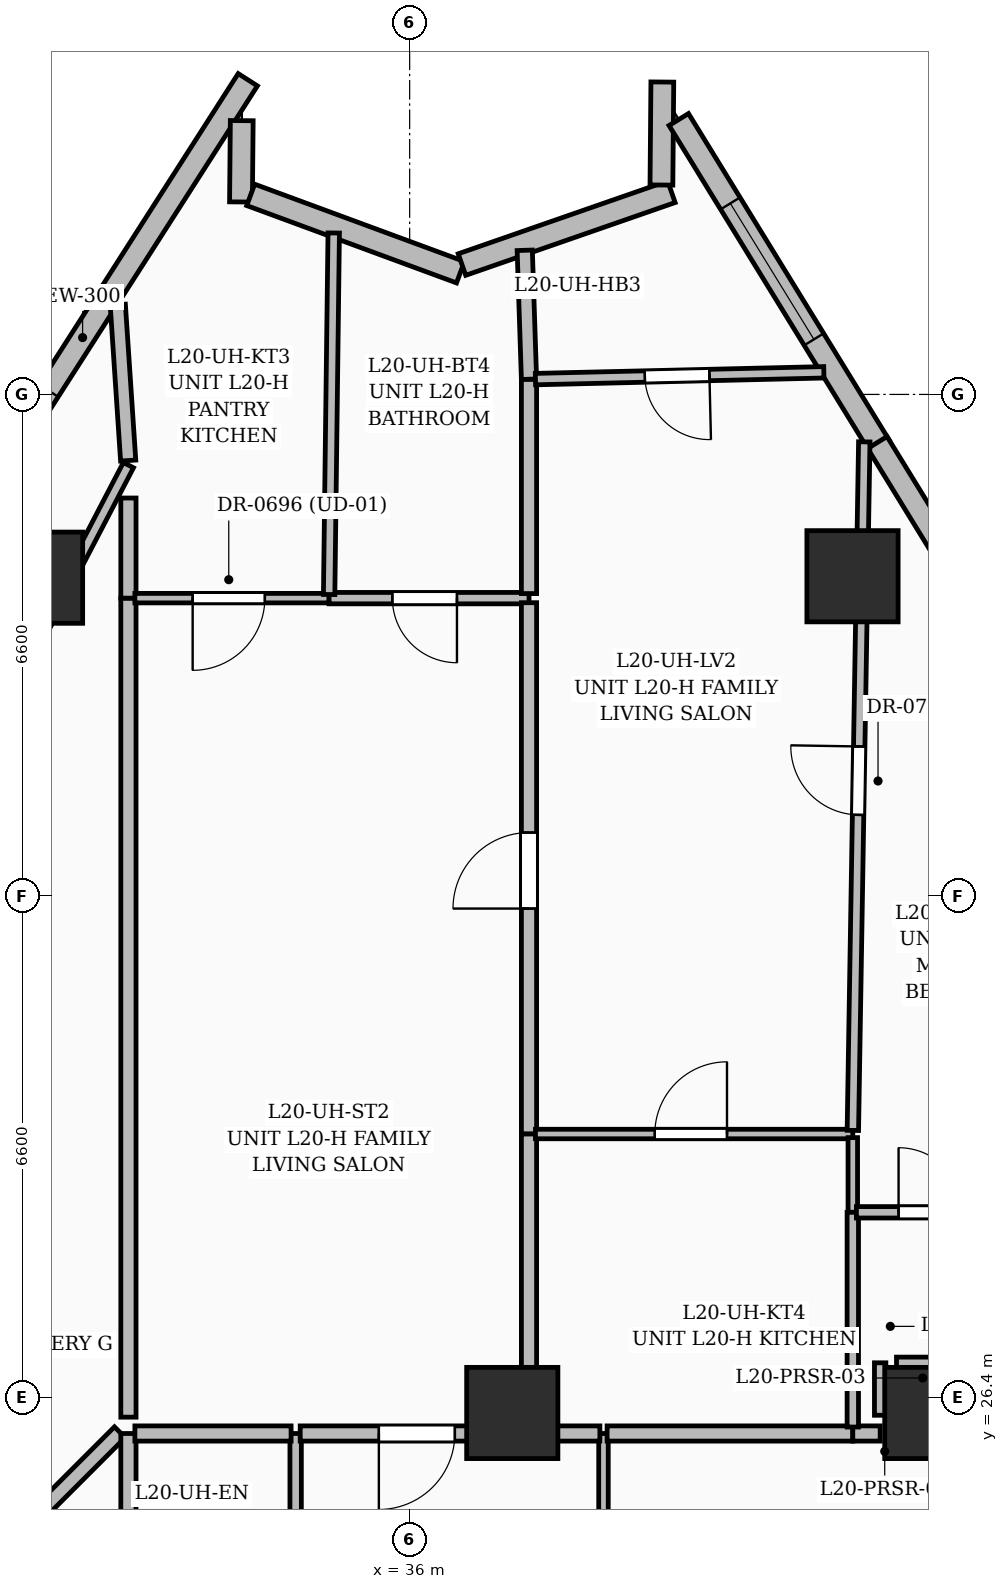
"""IFC4 building model, lengths in metres.
Left out: names, types, materials, properties, quantities, classifications, styles, units other than length and angle.
Written with IfcOpenShell. Run it as: python <this file> out.ifc"""

import sys

from ifc_helpers import new_model, si_unit, direction, frame, frame_2d, origin, origin_2d, place, context, subcontext, project, spatial, rectangle, extrude, element, fill, save


model = new_model("IFC4")
c1 = context("Model", 3, precision=1e-05, world=origin(), true_north=direction((0.0, 1.0)))
c2 = subcontext(c1, "Body", "Model", "MODEL_VIEW")
j1 = project(units=[si_unit("LENGTHUNIT", "METRE"), si_unit("PLANEANGLEUNIT", "RADIAN")], contexts=[c1])
p1 = place(None, origin())
s1 = spatial("IfcSite", under=j1, at=p1, CompositionType="ELEMENT")
p2 = place(p1, origin())
s2 = spatial("IfcBuilding", under=s1, at=p2, CompositionType="ELEMENT")
p3 = place(p2, frame((0.0, 0.0, 82.2)))
s3 = spatial("IfcBuildingStorey", under=s2, at=p3, CompositionType="ELEMENT", Elevation=82.2)
for number, where, z_axis, x_axis in (
    (1, (42.85, 26.2, 0.0), (0.0, 0.0, 1.0), (1.0, 0.0, 0.0)),
    (2, (37.35, 26.2, 0.0), (0.0, 0.0, 1.0), (1.0, 0.0, 0.0)),
    (3, (41.826, 37.208, 0.0), (0.0, 0.0, 1.0), (1.0, 0.0, 0.0)),
    (4, (31.098, 37.189, 0.0), (0.0, 0.0, 1.0), (1.0, 0.0, 0.0)),
):
    element("IfcColumn", number, at=place(p3, frame(where, z_axis=z_axis, x_axis=x_axis)), inside=s3, PredefinedType="COLUMN", context=c2, shape_type="SweptSolid", body=[
        extrude(rectangle(XDim=1.2, YDim=1.2, at=origin_2d()), origin(), (0.0, 0.0, 1.0), 3.6),
    ])
p4 = place(p3, frame((29.524, 36.955, 0.0), z_axis=(0.0, 0.0, 1.0), x_axis=(0.539470626143, 0.842004420136, 0.0)))
e5 = element("IfcWall", 5, at=p4, inside=s3, PredefinedType="SOLIDWALL", context=c2, shape_type="SweptSolid", body=[
    extrude(rectangle(XDim=8.058, YDim=0.3, at=frame_2d((4.029, 0.0))), origin(), (0.0, 0.0, 1.0), 3.35),
])
p5 = place(p4, frame((1.1, 0.0, 0.55)))
e6 = element("IfcOpeningElement", 6, at=p5, cuts=e5, PredefinedType="OPENING", context=c2, shape_type="SweptSolid", body=[
    extrude(rectangle(XDim=2.1, YDim=2.4, at=frame_2d((1.05, 1.2))), frame((0.0, 0.16, 0.0), z_axis=(0.0, -1.0, 0.0), x_axis=(1.0, 0.0, 0.0)), (0.0, 0.0, 1.0), 0.32),
])
p6 = place(p3, frame((33.791, 43.202, 0.0), z_axis=(0.0, 0.0, 1.0), x_axis=(-0.009584224316, -0.999954070267, 0.0)))
e7 = element("IfcWall", 7, at=p6, inside=s3, PredefinedType="SOLIDWALL", context=c2, shape_type="SweptSolid", body=[
    extrude(rectangle(XDim=1.07, YDim=0.3, at=frame_2d((0.535, 0.0))), origin(), (0.0, 0.0, 1.0), 3.35),
])
p7 = place(p3, frame((33.909, 42.225, 0.0), z_axis=(0.0, 0.0, 1.0), x_axis=(0.938225446259, -0.346024582931, 0.0)))
e8 = element("IfcWall", 8, at=p7, inside=s3, PredefinedType="SOLIDWALL", context=c2, shape_type="SweptSolid", body=[
    extrude(rectangle(XDim=2.941, YDim=0.3, at=frame_2d((1.471, 0.0))), origin(), (0.0, 0.0, 1.0), 3.35),
])
p8 = place(p3, frame((36.688, 41.309, 0.0), z_axis=(0.0, 0.0, 1.0), x_axis=(0.944571305793, 0.328306332978, 0.0)))
e9 = element("IfcWall", 9, at=p8, inside=s3, PredefinedType="SOLIDWALL", context=c2, shape_type="SweptSolid", body=[
    extrude(rectangle(XDim=2.917, YDim=0.3, at=frame_2d((1.458, 0.0))), origin(), (0.0, 0.0, 1.0), 3.35),
])
p9 = place(p3, frame((39.312, 42.355, 0.0), z_axis=(0.0, 0.0, 1.0), x_axis=(0.008828484753, 0.999961028169, 0.0)))
e10 = element("IfcWall", 10, at=p9, inside=s3, PredefinedType="SOLIDWALL", context=c2, shape_type="SweptSolid", body=[
    extrude(rectangle(XDim=1.355, YDim=0.3, at=frame_2d((0.677, 0.0))), origin(), (0.0, 0.0, 1.0), 3.35),
])
p10 = place(p3, frame((39.54, 43.217, 0.0), z_axis=(0.0, 0.0, 1.0), x_axis=(0.52373802156, -0.851879383935, 0.0)))
e11 = element("IfcWall", 11, at=p10, inside=s3, PredefinedType="SOLIDWALL", context=c2, shape_type="SweptSolid", body=[
    extrude(rectangle(XDim=5.042, YDim=0.3, at=frame_2d((2.521, 0.0))), origin(), (0.0, 0.0, 1.0), 3.35),
])
p11 = place(p10, frame((1.295, 0.0, 0.55)))
e12 = element("IfcOpeningElement", 12, at=p11, cuts=e11, PredefinedType="OPENING", context=c2, shape_type="SweptSolid", body=[
    extrude(rectangle(XDim=2.1, YDim=2.4, at=frame_2d((1.05, 1.2))), frame((0.0, 0.16, 0.0), z_axis=(0.0, -1.0, 0.0), x_axis=(1.0, 0.0, 0.0)), (0.0, 0.0, 1.0), 0.32),
])
p12 = place(p3, frame((42.153, 38.967, 0.0), z_axis=(0.0, 0.0, 1.0), x_axis=(0.523687465278, -0.851910464022, 0.0)))
e13 = element("IfcWall", 13, at=p12, inside=s3, PredefinedType="SOLIDWALL", context=c2, shape_type="SweptSolid", body=[
    extrude(rectangle(XDim=5.649, YDim=0.3, at=frame_2d((2.825, 0.0))), origin(), (0.0, 0.0, 1.0), 3.35),
])
p13 = place(p12, frame((1.778, 0.0, 0.55)))
e14 = element("IfcOpeningElement", 14, at=p13, cuts=e13, PredefinedType="OPENING", context=c2, shape_type="SweptSolid", body=[
    extrude(rectangle(XDim=2.1, YDim=2.4, at=frame_2d((1.05, 1.2))), frame((0.0, 0.16, 0.0), z_axis=(0.0, -1.0, 0.0), x_axis=(1.0, 0.0, 0.0)), (0.0, 0.0, 1.0), 0.32),
])
p14 = place(p3, frame((21.4, 17.75, 0.0), z_axis=(0.0, 0.0, 1.0), x_axis=(0.46207959711, 0.886838455376, 0.0)))
e15 = element("IfcWall", 15, at=p14, inside=s3, PredefinedType="PARTITIONING", context=c2, shape_type="SweptSolid", body=[
    extrude(rectangle(XDim=23.589, YDim=0.15, at=frame_2d((11.795, 0.0))), origin(), (0.0, 0.0, 1.0), 2.345),
])
p15 = place(p3, frame((32.297, 38.73, 0.0), z_axis=(0.0, 0.0, 1.0), x_axis=(-0.066629370629, 0.997777794386, 0.0)))
e16 = element("IfcWall", 16, at=p15, inside=s3, PredefinedType="PARTITIONING", context=c2, shape_type="SweptSolid", body=[
    extrude(rectangle(XDim=2.056, YDim=0.2, at=frame_2d((1.028, 0.0))), origin(), (0.0, 0.0, 1.0), 3.35),
])
p16 = place(p3, frame((32.187, 25.947, 0.0), z_axis=(0.0, 0.0, 1.0), x_axis=(-0.707106781187, -0.707106781187, 0.0)))
e17 = element("IfcWall", 17, at=p16, inside=s3, PredefinedType="PARTITIONING", context=c2, shape_type="SweptSolid", body=[
    extrude(rectangle(XDim=3.135, YDim=0.2, at=frame_2d((1.568, 0.0))), origin(), (0.0, 0.0, 1.0), 3.35),
])
p17 = place(p3, frame((32.3, 21.8, 0.0), z_axis=(0.0, 0.0, 1.0), x_axis=(0.0, 1.0, 0.0)))
e18 = element("IfcWall", 18, at=p17, inside=s3, PredefinedType="PARTITIONING", context=c2, shape_type="SweptSolid", body=[
    extrude(rectangle(XDim=4.13, YDim=0.2, at=frame_2d((2.065, 0.0))), origin(), (0.0, 0.0, 1.0), 2.709),
])
p18 = place(p3, frame((32.3, 26.145, 0.0), z_axis=(0.0, 0.0, 1.0), x_axis=(0.0, 1.0, 0.0)))
e19 = element("IfcWall", 19, at=p18, inside=s3, PredefinedType="PARTITIONING", context=c2, shape_type="SweptSolid", body=[
    extrude(rectangle(XDim=10.775, YDim=0.2, at=frame_2d((5.387, 0.0))), origin(), (0.0, 0.0, 1.0), 2.345),
])
p19 = place(p3, frame((32.3, 36.92, 0.0), z_axis=(0.0, 0.0, 1.0), x_axis=(0.0, 1.0, 0.0)))
e20 = element("IfcWall", 20, at=p19, inside=s3, PredefinedType="PARTITIONING", context=c2, shape_type="SweptSolid", body=[
    extrude(rectangle(XDim=1.317, YDim=0.2, at=frame_2d((0.659, 0.0))), origin(), (0.0, 0.0, 1.0), 2.37),
])
p20 = place(p3, frame((38.55, 25.93, 0.0), z_axis=(0.0, 0.0, 1.0), x_axis=(0.0, -1.0, 0.0)))
e21 = element("IfcWall", 21, at=p20, inside=s3, PredefinedType="PARTITIONING", context=c2, shape_type="SweptSolid", body=[
    extrude(rectangle(XDim=4.202, YDim=0.125, at=frame_2d((2.101, 0.0))), origin(), (0.0, 0.0, 1.0), 2.37),
])
p21 = place(p3, frame((41.956, 17.833, 0.0), z_axis=(0.0, 0.0, 1.0), x_axis=(0.182682671213, 0.98317192883, 0.0)))
e22 = element("IfcWall", 22, at=p21, inside=s3, PredefinedType="PARTITIONING", context=c2, shape_type="SweptSolid", body=[
    extrude(rectangle(XDim=8.235, YDim=0.2, at=frame_2d((4.118, 0.0))), origin(), (0.0, 0.0, 1.0), 2.309),
])
p22 = place(p3, frame((41.83, 25.93, 0.0), z_axis=(0.0, 0.0, 1.0), x_axis=(-1.0, 0.0, 0.0)))
e23 = element("IfcWall", 23, at=p22, inside=s3, PredefinedType="PARTITIONING", context=c2, shape_type="SweptSolid", body=[
    extrude(rectangle(XDim=3.233, YDim=0.2, at=frame_2d((1.616, 0.0))), origin(), (0.0, 0.0, 1.0), 2.37),
])
p23 = place(p3, frame((42.19, 25.93, 0.0), z_axis=(0.0, 0.0, 1.0), x_axis=(-1.0, 0.0, 0.0)))
e24 = element("IfcWall", 24, at=p23, inside=s3, PredefinedType="PARTITIONING", context=c2, shape_type="SweptSolid", body=[
    extrude(rectangle(XDim=0.36, YDim=0.2, at=frame_2d((0.18, 0.0))), origin(), (0.0, 0.0, 1.0), 2.37),
])
p24 = place(p3, frame((34.5, 25.93, 0.0), z_axis=(0.0, 0.0, 1.0), x_axis=(0.0, -1.0, 0.0)))
e25 = element("IfcWall", 25, at=p24, inside=s3, PredefinedType="PARTITIONING", context=c2, shape_type="SweptSolid", body=[
    extrude(rectangle(XDim=4.19, YDim=0.15, at=frame_2d((2.095, 0.0))), origin(), (0.0, 0.0, 1.0), 3.35),
])
p25 = place(p24, frame((1.758, 0.0, 0.0)))
e26 = element("IfcOpeningElement", 26, at=p25, cuts=e25, PredefinedType="OPENING", context=c2, shape_type="SweptSolid", body=[
    extrude(rectangle(XDim=0.85, YDim=2.1, at=frame_2d((0.425, 1.05))), frame((0.0, 0.085, 0.0), z_axis=(0.0, -1.0, 0.0), x_axis=(1.0, 0.0, 0.0)), (0.0, 0.0, 1.0), 0.17),
])
p26 = place(p3, frame((37.57, 25.93, 0.0), z_axis=(0.0, 0.0, 1.0), x_axis=(-1.0, 0.0, 0.0)))
e27 = element("IfcWall", 27, at=p26, inside=s3, PredefinedType="PARTITIONING", context=c2, shape_type="SweptSolid", body=[
    extrude(rectangle(XDim=3.01, YDim=0.2, at=frame_2d((1.505, 0.0))), origin(), (0.0, 0.0, 1.0), 3.35),
])
p27 = place(p26, frame((0.975, 0.0, 0.0)))
e28 = element("IfcOpeningElement", 28, at=p27, cuts=e27, PredefinedType="OPENING", context=c2, shape_type="SweptSolid", body=[
    extrude(rectangle(XDim=1.0, YDim=2.2, at=frame_2d((0.5, 1.1))), frame((0.0, 0.11, 0.0), z_axis=(0.0, -1.0, 0.0), x_axis=(1.0, 0.0, 0.0)), (0.0, 0.0, 1.0), 0.22),
])
p28 = place(p3, frame((38.502, 25.93, 0.0), z_axis=(0.0, 0.0, 1.0), x_axis=(-1.0, 0.0, 0.0)))
e29 = element("IfcWall", 29, at=p28, inside=s3, PredefinedType="PARTITIONING", context=c2, shape_type="SweptSolid", body=[
    extrude(rectangle(XDim=0.932, YDim=0.2, at=frame_2d((0.466, 0.0))), origin(), (0.0, 0.0, 1.0), 2.37),
])
p29 = place(p3, frame((34.44, 25.93, 0.0), z_axis=(0.0, 0.0, 1.0), x_axis=(-1.0, 0.0, 0.0)))
e30 = element("IfcWall", 30, at=p29, inside=s3, PredefinedType="PARTITIONING", context=c2, shape_type="SweptSolid", body=[
    extrude(rectangle(XDim=2.055, YDim=0.2, at=frame_2d((1.027, 0.0))), origin(), (0.0, 0.0, 1.0), 2.709),
])
p30 = place(p3, frame((34.94, 36.92, 0.0), z_axis=(0.0, 0.0, 1.0), x_axis=(-1.0, 0.0, 0.0)))
e31 = element("IfcWall", 31, at=p30, inside=s3, PredefinedType="PARTITIONING", context=c2, shape_type="SweptSolid", body=[
    extrude(rectangle(XDim=2.555, YDim=0.125, at=frame_2d((1.277, 0.0))), origin(), (0.0, 0.0, 1.0), 2.37),
])
p31 = place(p30, frame((0.845, 0.0, 0.0)))
e32 = element("IfcOpeningElement", 32, at=p31, cuts=e31, PredefinedType="OPENING", context=c2, shape_type="SweptSolid", body=[
    extrude(rectangle(XDim=0.95, YDim=2.2, at=frame_2d((0.475, 1.1))), frame((0.0, 0.072, 0.0), z_axis=(0.0, -1.0, 0.0), x_axis=(1.0, 0.0, 0.0)), (0.0, 0.0, 1.0), 0.145),
])
p32 = place(p3, frame((37.57, 36.92, 0.0), z_axis=(0.0, 0.0, 1.0), x_axis=(-1.0, 0.0, 0.0)))
e33 = element("IfcWall", 33, at=p32, inside=s3, PredefinedType="PARTITIONING", context=c2, shape_type="SweptSolid", body=[
    extrude(rectangle(XDim=2.63, YDim=0.15, at=frame_2d((1.315, 0.0))), origin(), (0.0, 0.0, 1.0), 2.37),
])
p33 = place(p32, frame((0.948, 0.0, 0.0)))
e34 = element("IfcOpeningElement", 34, at=p33, cuts=e33, PredefinedType="OPENING", context=c2, shape_type="SweptSolid", body=[
    extrude(rectangle(XDim=0.85, YDim=2.1, at=frame_2d((0.425, 1.05))), frame((0.0, 0.085, 0.0), z_axis=(0.0, -1.0, 0.0), x_axis=(1.0, 0.0, 0.0)), (0.0, 0.0, 1.0), 0.17),
])
p34 = place(p3, frame((37.57, 29.87, 0.0), z_axis=(0.0, 0.0, 1.0), x_axis=(0.0, 1.0, 0.0)))
e35 = element("IfcWall", 35, at=p34, inside=s3, PredefinedType="PARTITIONING", context=c2, shape_type="SweptSolid", body=[
    extrude(rectangle(XDim=6.99, YDim=0.2, at=frame_2d((3.495, 0.0))), origin(), (0.0, 0.0, 1.0), 2.37),
])
p35 = place(p34, frame((2.966, 0.0, 0.0)))
e36 = element("IfcOpeningElement", 36, at=p35, cuts=e35, PredefinedType="OPENING", context=c2, shape_type="SweptSolid", body=[
    extrude(rectangle(XDim=1.0, YDim=2.2, at=frame_2d((0.5, 1.1))), frame((0.0, 0.11, 0.0), z_axis=(0.0, -1.0, 0.0), x_axis=(1.0, 0.0, 0.0)), (0.0, 0.0, 1.0), 0.22),
])
p36 = place(p3, frame((37.57, 26.015, 0.0), z_axis=(0.0, 0.0, 1.0), x_axis=(0.0, 1.0, 0.0)))
e37 = element("IfcWall", 37, at=p36, inside=s3, PredefinedType="PARTITIONING", context=c2, shape_type="SweptSolid", body=[
    extrude(rectangle(XDim=3.855, YDim=0.2, at=frame_2d((1.928, 0.0))), origin(), (0.0, 0.0, 1.0), 2.709),
])
p37 = place(p3, frame((34.94, 36.968, 0.0), z_axis=(0.0, 0.0, 1.0), x_axis=(0.012728014725, 0.99991899554, 0.0)))
e38 = element("IfcWall", 38, at=p37, inside=s3, PredefinedType="PARTITIONING", context=c2, shape_type="SweptSolid", body=[
    extrude(rectangle(XDim=4.757, YDim=0.15, at=frame_2d((2.378, 0.0))), origin(), (0.0, 0.0, 1.0), 2.37),
])
p38 = place(p3, frame((37.57, 36.98, 0.0), z_axis=(0.0, 0.0, 1.0), x_axis=(0.0, 1.0, 0.0)))
e39 = element("IfcWall", 39, at=p38, inside=s3, PredefinedType="PARTITIONING", context=c2, shape_type="SweptSolid", body=[
    extrude(rectangle(XDim=2.82, YDim=0.2, at=frame_2d((1.41, 0.0))), origin(), (0.0, 0.0, 1.0), 2.37),
])
p39 = place(p3, frame((37.57, 39.8, 0.0), z_axis=(0.0, 0.0, 1.0), x_axis=(-0.033089686033, 0.999452386399, 0.0)))
e40 = element("IfcWall", 40, at=p39, inside=s3, PredefinedType="PARTITIONING", context=c2, shape_type="SweptSolid", body=[
    extrude(rectangle(XDim=1.697, YDim=0.2, at=frame_2d((0.849, 0.0))), origin(), (0.0, 0.0, 1.0), 3.35),
])
p40 = place(p3, frame((41.449, 39.891, 0.0), z_axis=(0.0, 0.0, 1.0), x_axis=(-0.999721247685, -0.02360989047, 0.0)))
e41 = element("IfcWall", 41, at=p40, inside=s3, PredefinedType="PARTITIONING", context=c2, shape_type="SweptSolid", body=[
    extrude(rectangle(XDim=3.795, YDim=0.15, at=frame_2d((1.897, 0.0))), origin(), (0.0, 0.0, 1.0), 3.35),
])
p41 = place(p40, frame((1.506, 0.0, 0.0)))
e42 = element("IfcOpeningElement", 42, at=p41, cuts=e41, PredefinedType="OPENING", context=c2, shape_type="SweptSolid", body=[
    extrude(rectangle(XDim=0.85, YDim=2.1, at=frame_2d((0.425, 1.05))), frame((0.0, 0.085, 0.0), z_axis=(0.0, -1.0, 0.0), x_axis=(1.0, 0.0, 0.0)), (0.0, 0.0, 1.0), 0.17),
])
p42 = place(p3, frame((37.655, 29.87, 0.0), z_axis=(0.0, 0.0, 1.0), x_axis=(1.0, 0.0, 0.0)))
e43 = element("IfcWall", 43, at=p42, inside=s3, PredefinedType="PARTITIONING", context=c2, shape_type="SweptSolid", body=[
    extrude(rectangle(XDim=4.175, YDim=0.125, at=frame_2d((2.087, 0.0))), origin(), (0.0, 0.0, 1.0), 3.35),
])
p43 = place(p42, frame((1.57, 0.0, 0.0)))
e44 = element("IfcOpeningElement", 44, at=p43, cuts=e43, PredefinedType="OPENING", context=c2, shape_type="SweptSolid", body=[
    extrude(rectangle(XDim=0.95, YDim=2.2, at=frame_2d((0.475, 1.1))), frame((0.0, 0.072, 0.0), z_axis=(0.0, -1.0, 0.0), x_axis=(1.0, 0.0, 0.0)), (0.0, 0.0, 1.0), 0.145),
])
p44 = place(p3, frame((41.831, 29.917, 0.0), z_axis=(0.0, 0.0, 1.0), x_axis=(0.016599696118, 0.999862215552, 0.0)))
e45 = element("IfcWall", 45, at=p44, inside=s3, PredefinedType="PARTITIONING", context=c2, shape_type="SweptSolid", body=[
    extrude(rectangle(XDim=9.06, YDim=0.15, at=frame_2d((4.53, 0.0))), origin(), (0.0, 0.0, 1.0), 2.345),
])
p45 = place(p44, frame((4.152, 0.0, 0.0)))
e46 = element("IfcOpeningElement", 46, at=p45, cuts=e45, PredefinedType="OPENING", context=c2, shape_type="SweptSolid", body=[
    extrude(rectangle(XDim=0.9, YDim=2.15, at=frame_2d((0.45, 1.075))), frame((0.0, 0.085, 0.0), z_axis=(0.0, -1.0, 0.0), x_axis=(1.0, 0.0, 0.0)), (0.0, 0.0, 1.0), 0.17),
])
p46 = place(p3, frame((41.83, 28.84, 0.0), z_axis=(0.0, 0.0, 1.0), x_axis=(0.0, 1.0, 0.0)))
e47 = element("IfcWall", 47, at=p46, inside=s3, PredefinedType="PARTITIONING", context=c2, shape_type="SweptSolid", body=[
    extrude(rectangle(XDim=0.982, YDim=0.125, at=frame_2d((0.491, 0.0))), origin(), (0.0, 0.0, 1.0), 2.709),
])
p47 = place(p3, frame((41.83, 26.015, 0.0), z_axis=(0.0, 0.0, 1.0), x_axis=(0.0, 1.0, 0.0)))
e48 = element("IfcWall", 48, at=p47, inside=s3, PredefinedType="PARTITIONING", context=c2, shape_type="SweptSolid", body=[
    extrude(rectangle(XDim=2.825, YDim=0.15, at=frame_2d((1.413, 0.0))), origin(), (0.0, 0.0, 1.0), 2.37),
])
p48 = place(p3, frame((41.877, 28.84, 0.0), z_axis=(0.0, 0.0, 1.0), x_axis=(1.0, 0.0, 0.0)))
e49 = element("IfcWall", 49, at=p48, inside=s3, PredefinedType="PARTITIONING", context=c2, shape_type="SweptSolid", body=[
    extrude(rectangle(XDim=2.038, YDim=0.15, at=frame_2d((1.019, 0.0))), origin(), (0.0, 0.0, 1.0), 2.345),
])
p49 = place(p48, frame((0.555, 0.0, 0.0)))
e50 = element("IfcOpeningElement", 50, at=p49, cuts=e49, PredefinedType="OPENING", context=c2, shape_type="SweptSolid", body=[
    extrude(rectangle(XDim=0.85, YDim=2.1, at=frame_2d((0.425, 1.05))), frame((0.0, 0.085, 0.0), z_axis=(0.0, -1.0, 0.0), x_axis=(1.0, 0.0, 0.0)), (0.0, 0.0, 1.0), 0.17),
])
p50 = place(p3, frame((42.19, 26.17, 0.0), z_axis=(0.0, 0.0, 1.0), x_axis=(0.0, 1.0, 0.0)))
e51 = element("IfcWall", 51, at=p50, inside=s3, PredefinedType="PARTITIONING", context=c2, shape_type="SweptSolid", body=[
    extrude(rectangle(XDim=0.69, YDim=0.15, at=frame_2d((0.345, 0.0))), origin(), (0.0, 0.0, 1.0), 2.37),
])
p51 = place(p3, frame((42.405, 26.86, 0.0), z_axis=(0.0, 0.0, 1.0), x_axis=(1.0, 0.0, 0.0)))
e52 = element("IfcWall", 52, at=p51, inside=s3, PredefinedType="PARTITIONING", context=c2, shape_type="SweptSolid", body=[
    extrude(rectangle(XDim=0.983, YDim=0.15, at=frame_2d((0.491, 0.0))), origin(), (0.0, 0.0, 1.0), 2.345),
])
p52 = place(p11, origin())
e53 = element("IfcWindow", 53, at=p52, inside=s3, PartitioningType="SINGLE_PANEL", PredefinedType="WINDOW", context=c2, shape_type="SweptSolid", body=[
    extrude(rectangle(XDim=2.1, YDim=2.4, at=frame_2d((1.05, 1.2))), frame((0.0, 0.03, 0.0), z_axis=(0.0, -1.0, 0.0), x_axis=(1.0, 0.0, 0.0)), (0.0, 0.0, 1.0), 0.06),
])
fill(e12, e53)
p53 = place(p31, origin())
e54 = element("IfcDoor", 54, at=p53, inside=s3, OperationType="SINGLE_SWING_RIGHT", PredefinedType="DOOR", context=c2, shape_type="SweptSolid", body=[
    extrude(rectangle(XDim=0.95, YDim=2.2, at=frame_2d((0.475, 1.1))), frame((0.0, 0.025, 0.0), z_axis=(0.0, -1.0, 0.0), x_axis=(1.0, 0.0, 0.0)), (0.0, 0.0, 1.0), 0.05),
])
fill(e32, e54)
p54 = place(p33, origin())
e55 = element("IfcDoor", 55, at=p54, inside=s3, OperationType="SINGLE_SWING_LEFT", PredefinedType="DOOR", context=c2, shape_type="SweptSolid", body=[
    extrude(rectangle(XDim=0.85, YDim=2.1, at=frame_2d((0.425, 1.05))), frame((0.0, 0.025, 0.0), z_axis=(0.0, -1.0, 0.0), x_axis=(1.0, 0.0, 0.0)), (0.0, 0.0, 1.0), 0.05),
])
fill(e34, e55)
p55 = place(p43, origin())
e56 = element("IfcDoor", 56, at=p55, inside=s3, OperationType="SINGLE_SWING_RIGHT", PredefinedType="DOOR", context=c2, shape_type="SweptSolid", body=[
    extrude(rectangle(XDim=0.95, YDim=2.2, at=frame_2d((0.475, 1.1))), frame((0.0, 0.025, 0.0), z_axis=(0.0, -1.0, 0.0), x_axis=(1.0, 0.0, 0.0)), (0.0, 0.0, 1.0), 0.05),
])
fill(e44, e56)
p56 = place(p41, origin())
e57 = element("IfcDoor", 57, at=p56, inside=s3, OperationType="SINGLE_SWING_LEFT", PredefinedType="DOOR", context=c2, shape_type="SweptSolid", body=[
    extrude(rectangle(XDim=0.85, YDim=2.1, at=frame_2d((0.425, 1.05))), frame((0.0, 0.025, 0.0), z_axis=(0.0, -1.0, 0.0), x_axis=(1.0, 0.0, 0.0)), (0.0, 0.0, 1.0), 0.05),
])
fill(e42, e57)
p57 = place(p45, origin())
e58 = element("IfcDoor", 58, at=p57, inside=s3, OperationType="SINGLE_SWING_RIGHT", PredefinedType="DOOR", context=c2, shape_type="SweptSolid", body=[
    extrude(rectangle(XDim=0.9, YDim=2.15, at=frame_2d((0.45, 1.075))), frame((0.0, 0.025, 0.0), z_axis=(0.0, -1.0, 0.0), x_axis=(1.0, 0.0, 0.0)), (0.0, 0.0, 1.0), 0.05),
])
fill(e46, e58)
p58 = place(p49, origin())
e59 = element("IfcDoor", 59, at=p58, inside=s3, OperationType="SINGLE_SWING_LEFT", PredefinedType="DOOR", context=c2, shape_type="SweptSolid", body=[
    extrude(rectangle(XDim=0.85, YDim=2.1, at=frame_2d((0.425, 1.05))), frame((0.0, 0.025, 0.0), z_axis=(0.0, -1.0, 0.0), x_axis=(1.0, 0.0, 0.0)), (0.0, 0.0, 1.0), 0.05),
])
fill(e50, e59)
p59 = place(p27, origin())
e60 = element("IfcDoor", 60, at=p59, inside=s3, OperationType="SINGLE_SWING_RIGHT", PredefinedType="DOOR", context=c2, shape_type="SweptSolid", body=[
    extrude(rectangle(XDim=1.0, YDim=2.2, at=frame_2d((0.5, 1.1))), frame((0.0, 0.025, 0.0), z_axis=(0.0, -1.0, 0.0), x_axis=(1.0, 0.0, 0.0)), (0.0, 0.0, 1.0), 0.05),
])
fill(e28, e60)
p60 = place(p35, origin())
e61 = element("IfcDoor", 61, at=p60, inside=s3, OperationType="SINGLE_SWING_LEFT", PredefinedType="DOOR", context=c2, shape_type="SweptSolid", body=[
    extrude(rectangle(XDim=1.0, YDim=2.2, at=frame_2d((0.5, 1.1))), frame((0.0, 0.025, 0.0), z_axis=(0.0, -1.0, 0.0), x_axis=(1.0, 0.0, 0.0)), (0.0, 0.0, 1.0), 0.05),
])
fill(e36, e61)
save(model, sys.argv[1])
